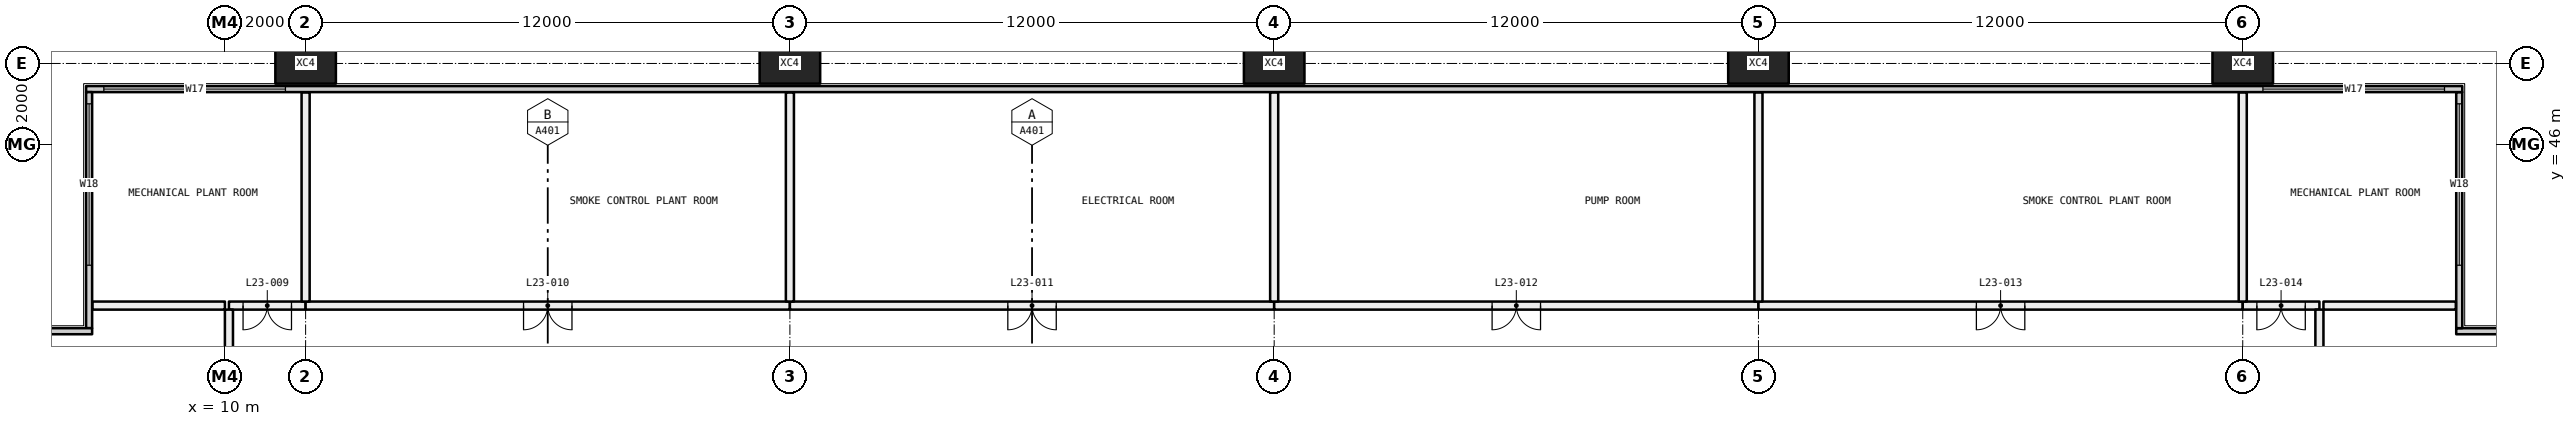
"""IFC4 building model, lengths in metres.
Left out: names, types, materials, properties, quantities, classifications, styles, units other than length and angle.
Written with IfcOpenShell. Run it as: python <this file> out.ifc"""

import sys

from ifc_helpers import new_model, si_unit, direction, frame, frame_2d, origin, origin_2d, place, context, subcontext, project, spatial, rectangle, hollow_rectangle, extrude, element, fill, save


model = new_model("IFC4")
c1 = context("Model", 3, precision=1e-05, world=origin(), true_north=direction((0.0, 1.0)))
c2 = subcontext(c1, "Body", "Model", "MODEL_VIEW")
j1 = project(units=[si_unit("LENGTHUNIT", "METRE"), si_unit("PLANEANGLEUNIT", "RADIAN")], contexts=[c1])
p1 = place(None, origin())
s1 = spatial("IfcSite", under=j1, at=p1, CompositionType="ELEMENT")
p2 = place(p1, origin())
s2 = spatial("IfcBuilding", under=s1, at=p2, CompositionType="ELEMENT")
p3 = place(p2, frame((0.0, 0.0, 92.1)))
s3 = spatial("IfcBuildingStorey", under=s2, at=p3, CompositionType="ELEMENT", Elevation=92.1)
for number, where, z_axis, x_axis in (
    (1, (12.0, 48.0, -0.4), (0.0, 0.0, 1.0), (1.0, 0.0, 0.0)),
    (2, (24.0, 48.0, -0.4), (0.0, 0.0, 1.0), (1.0, 0.0, 0.0)),
    (3, (36.0, 48.0, -0.4), (0.0, 0.0, 1.0), (1.0, 0.0, 0.0)),
    (4, (48.0, 48.0, -0.4), (0.0, 0.0, 1.0), (1.0, 0.0, 0.0)),
    (5, (60.0, 48.0, -0.4), (0.0, 0.0, 1.0), (1.0, 0.0, 0.0)),
):
    element("IfcColumn", number, at=place(p3, frame(where, z_axis=z_axis, x_axis=x_axis)), inside=s3, PredefinedType="COLUMN", context=c2, shape_type="SweptSolid", body=[
        extrude(hollow_rectangle(XDim=1.5, YDim=1.0, WallThickness=0.06, at=origin_2d()), origin(), (0.0, 0.0, 1.0), 4.5),
    ])
p4 = place(p3, frame((65.29, 41.365, 0.0), z_axis=(0.0, 0.0, 1.0), x_axis=(1.0, 0.0, 0.0)))
e6 = element("IfcWall", 6, at=p4, inside=s3, PredefinedType="ELEMENTEDWALL", context=c2, shape_type="SweptSolid", body=[
    extrude(rectangle(XDim=6.15, YDim=0.15, at=frame_2d((3.075, 0.0))), origin(), (0.0, 0.0, 1.0), 4.1),
])
p5 = place(p4, frame((1.71, 0.0, 0.45)))
e7 = element("IfcOpeningElement", 7, at=p5, cuts=e6, PredefinedType="OPENING", context=c2, shape_type="SweptSolid", body=[
    extrude(rectangle(XDim=4.0, YDim=3.6, at=frame_2d((2.0, 1.8))), frame((0.0, 0.085, 0.0), z_axis=(0.0, -1.0, 0.0), x_axis=(1.0, 0.0, 0.0)), (0.0, 0.0, 1.0), 0.17),
])
p6 = place(p3, frame((65.365, 41.44, 0.0), z_axis=(0.0, 0.0, 1.0), x_axis=(0.0, 1.0, 0.0)))
e8 = element("IfcWall", 8, at=p6, inside=s3, PredefinedType="ELEMENTEDWALL", context=c2, shape_type="SweptSolid", body=[
    extrude(rectangle(XDim=5.85, YDim=0.15, at=frame_2d((2.925, 0.0))), origin(), (0.0, 0.0, 1.0), 4.1),
])
p7 = place(p6, frame((1.56, 0.0, 0.45)))
e9 = element("IfcOpeningElement", 9, at=p7, cuts=e8, PredefinedType="OPENING", context=c2, shape_type="SweptSolid", body=[
    extrude(rectangle(XDim=4.0, YDim=3.6, at=frame_2d((2.0, 1.8))), frame((0.0, 0.085, 0.0), z_axis=(0.0, -1.0, 0.0), x_axis=(1.0, 0.0, 0.0)), (0.0, 0.0, 1.0), 0.17),
])
p8 = place(p3, frame((6.56, 47.365, 0.0), z_axis=(0.0, 0.0, 1.0), x_axis=(1.0, 0.0, 0.0)))
e10 = element("IfcWall", 10, at=p8, inside=s3, PredefinedType="ELEMENTEDWALL", context=c2, shape_type="SweptSolid", body=[
    extrude(rectangle(XDim=58.88, YDim=0.15, at=frame_2d((29.44, 0.0))), origin(), (0.0, 0.0, 1.0), 4.1),
])
p9 = place(p8, frame((0.44, 0.0, 0.45)))
e11 = element("IfcOpeningElement", 11, at=p9, cuts=e10, PredefinedType="OPENING", context=c2, shape_type="SweptSolid", body=[
    extrude(rectangle(XDim=4.5, YDim=3.6, at=frame_2d((2.25, 1.8))), frame((0.0, 0.085, 0.0), z_axis=(0.0, -1.0, 0.0), x_axis=(1.0, 0.0, 0.0)), (0.0, 0.0, 1.0), 0.17),
])
p10 = place(p8, frame((53.94, 0.0, 0.45)))
e12 = element("IfcOpeningElement", 12, at=p10, cuts=e10, PredefinedType="OPENING", context=c2, shape_type="SweptSolid", body=[
    extrude(rectangle(XDim=4.5, YDim=3.6, at=frame_2d((2.25, 1.8))), frame((0.0, 0.085, 0.0), z_axis=(0.0, -1.0, 0.0), x_axis=(1.0, 0.0, 0.0)), (0.0, 0.0, 1.0), 0.17),
])
p11 = place(p3, frame((6.635, 41.44, 0.0), z_axis=(0.0, 0.0, 1.0), x_axis=(0.0, 1.0, 0.0)))
e13 = element("IfcWall", 13, at=p11, inside=s3, PredefinedType="ELEMENTEDWALL", context=c2, shape_type="SweptSolid", body=[
    extrude(rectangle(XDim=5.85, YDim=0.15, at=frame_2d((2.925, 0.0))), origin(), (0.0, 0.0, 1.0), 4.1),
])
p12 = place(p11, frame((1.56, 0.0, 0.45)))
e14 = element("IfcOpeningElement", 14, at=p12, cuts=e13, PredefinedType="OPENING", context=c2, shape_type="SweptSolid", body=[
    extrude(rectangle(XDim=4.0, YDim=3.6, at=frame_2d((2.0, 1.8))), frame((0.0, 0.085, 0.0), z_axis=(0.0, -1.0, 0.0), x_axis=(1.0, 0.0, 0.0)), (0.0, 0.0, 1.0), 0.17),
])
p13 = place(p3, frame((0.56, 41.365, 0.0), z_axis=(0.0, 0.0, 1.0), x_axis=(1.0, 0.0, 0.0)))
e15 = element("IfcWall", 15, at=p13, inside=s3, PredefinedType="ELEMENTEDWALL", context=c2, shape_type="SweptSolid", body=[
    extrude(rectangle(XDim=6.15, YDim=0.15, at=frame_2d((3.075, 0.0))), origin(), (0.0, 0.0, 1.0), 4.1),
])
p14 = place(p13, frame((0.44, 0.0, 0.45)))
e16 = element("IfcOpeningElement", 16, at=p14, cuts=e15, PredefinedType="OPENING", context=c2, shape_type="SweptSolid", body=[
    extrude(rectangle(XDim=4.0, YDim=3.6, at=frame_2d((2.0, 1.8))), frame((0.0, 0.085, 0.0), z_axis=(0.0, -1.0, 0.0), x_axis=(1.0, 0.0, 0.0)), (0.0, 0.0, 1.0), 0.17),
])
p15 = place(p3, frame((12.0, 42.0, 0.0), z_axis=(0.0, 0.0, 1.0), x_axis=(-1.0, 0.0, 0.0)))
e17 = element("IfcWall", 17, at=p15, inside=s3, PredefinedType="PARTITIONING", context=c2, shape_type="SweptSolid", body=[
    extrude(rectangle(XDim=1.9, YDim=0.2, at=frame_2d((0.95, 0.0))), origin(), (0.0, 0.0, 1.0), 4.1),
])
p16 = place(p15, frame((0.35, 0.0, 0.0)))
e18 = element("IfcOpeningElement", 18, at=p16, cuts=e17, PredefinedType="OPENING", context=c2, shape_type="SweptSolid", body=[
    extrude(rectangle(XDim=1.2, YDim=2.1, at=frame_2d((0.6, 1.05))), frame((0.0, 0.11, 0.0), z_axis=(0.0, -1.0, 0.0), x_axis=(1.0, 0.0, 0.0)), (0.0, 0.0, 1.0), 0.22),
])
p17 = place(p3, frame((24.0, 42.0, 0.0), z_axis=(0.0, 0.0, 1.0), x_axis=(-1.0, 0.0, 0.0)))
e19 = element("IfcWall", 19, at=p17, inside=s3, PredefinedType="PARTITIONING", context=c2, shape_type="SweptSolid", body=[
    extrude(rectangle(XDim=12.0, YDim=0.2, at=frame_2d((6.0, 0.0))), origin(), (0.0, 0.0, 1.0), 4.1),
])
p18 = place(p17, frame((5.4, 0.0, 0.0)))
e20 = element("IfcOpeningElement", 20, at=p18, cuts=e19, PredefinedType="OPENING", context=c2, shape_type="SweptSolid", body=[
    extrude(rectangle(XDim=1.2, YDim=2.1, at=frame_2d((0.6, 1.05))), frame((0.0, 0.11, 0.0), z_axis=(0.0, -1.0, 0.0), x_axis=(1.0, 0.0, 0.0)), (0.0, 0.0, 1.0), 0.22),
])
p19 = place(p3, frame((36.0, 42.0, 0.0), z_axis=(0.0, 0.0, 1.0), x_axis=(-1.0, 0.0, 0.0)))
e21 = element("IfcWall", 21, at=p19, inside=s3, PredefinedType="PARTITIONING", context=c2, shape_type="SweptSolid", body=[
    extrude(rectangle(XDim=12.0, YDim=0.2, at=frame_2d((6.0, 0.0))), origin(), (0.0, 0.0, 1.0), 3.5),
])
p20 = place(p19, frame((5.4, 0.0, 0.0)))
e22 = element("IfcOpeningElement", 22, at=p20, cuts=e21, PredefinedType="OPENING", context=c2, shape_type="SweptSolid", body=[
    extrude(rectangle(XDim=1.2, YDim=2.1, at=frame_2d((0.6, 1.05))), frame((0.0, 0.11, 0.0), z_axis=(0.0, -1.0, 0.0), x_axis=(1.0, 0.0, 0.0)), (0.0, 0.0, 1.0), 0.22),
])
p21 = place(p3, frame((48.0, 42.0, 0.0), z_axis=(0.0, 0.0, 1.0), x_axis=(-1.0, 0.0, 0.0)))
e23 = element("IfcWall", 23, at=p21, inside=s3, PredefinedType="PARTITIONING", context=c2, shape_type="SweptSolid", body=[
    extrude(rectangle(XDim=12.0, YDim=0.2, at=frame_2d((6.0, 0.0))), origin(), (0.0, 0.0, 1.0), 3.5),
])
p22 = place(p21, frame((5.4, 0.0, 0.0)))
e24 = element("IfcOpeningElement", 24, at=p22, cuts=e23, PredefinedType="OPENING", context=c2, shape_type="SweptSolid", body=[
    extrude(rectangle(XDim=1.2, YDim=2.1, at=frame_2d((0.6, 1.05))), frame((0.0, 0.11, 0.0), z_axis=(0.0, -1.0, 0.0), x_axis=(1.0, 0.0, 0.0)), (0.0, 0.0, 1.0), 0.22),
])
p23 = place(p3, frame((60.0, 42.0, 0.0), z_axis=(0.0, 0.0, 1.0), x_axis=(-1.0, 0.0, 0.0)))
e25 = element("IfcWall", 25, at=p23, inside=s3, PredefinedType="PARTITIONING", context=c2, shape_type="SweptSolid", body=[
    extrude(rectangle(XDim=12.0, YDim=0.2, at=frame_2d((6.0, 0.0))), origin(), (0.0, 0.0, 1.0), 4.1),
])
p24 = place(p23, frame((5.4, 0.0, 0.0)))
e26 = element("IfcOpeningElement", 26, at=p24, cuts=e25, PredefinedType="OPENING", context=c2, shape_type="SweptSolid", body=[
    extrude(rectangle(XDim=1.2, YDim=2.1, at=frame_2d((0.6, 1.05))), frame((0.0, 0.11, 0.0), z_axis=(0.0, -1.0, 0.0), x_axis=(1.0, 0.0, 0.0)), (0.0, 0.0, 1.0), 0.22),
])
p25 = place(p3, frame((61.9, 42.0, 0.0), z_axis=(0.0, 0.0, 1.0), x_axis=(-1.0, 0.0, 0.0)))
e27 = element("IfcWall", 27, at=p25, inside=s3, PredefinedType="PARTITIONING", context=c2, shape_type="SweptSolid", body=[
    extrude(rectangle(XDim=1.9, YDim=0.2, at=frame_2d((0.95, 0.0))), origin(), (0.0, 0.0, 1.0), 4.1),
])
p26 = place(p25, frame((0.35, 0.0, 0.0)))
e28 = element("IfcOpeningElement", 28, at=p26, cuts=e27, PredefinedType="OPENING", context=c2, shape_type="SweptSolid", body=[
    extrude(rectangle(XDim=1.2, YDim=2.1, at=frame_2d((0.6, 1.05))), frame((0.0, 0.11, 0.0), z_axis=(0.0, -1.0, 0.0), x_axis=(1.0, 0.0, 0.0)), (0.0, 0.0, 1.0), 0.22),
])
p27 = place(p3, frame((10.1, 41.9, 0.0), z_axis=(0.0, 0.0, 1.0), x_axis=(0.0, -1.0, 0.0)))
e29 = element("IfcWall", 29, at=p27, inside=s3, PredefinedType="PARTITIONING", context=c2, shape_type="SweptSolid", body=[
    extrude(rectangle(XDim=17.9, YDim=0.2, at=frame_2d((8.95, 0.0))), origin(), (0.0, 0.0, 1.0), 3.5),
])
p28 = place(p27, frame((8.35, 0.0, 0.0)))
e30 = element("IfcOpeningElement", 30, at=p28, cuts=e29, PredefinedType="OPENING", context=c2, shape_type="SweptSolid", body=[
    extrude(rectangle(XDim=1.2, YDim=2.1, at=frame_2d((0.6, 1.05))), frame((0.0, 0.11, 0.0), z_axis=(0.0, -1.0, 0.0), x_axis=(1.0, 0.0, 0.0)), (0.0, 0.0, 1.0), 0.22),
])
p29 = place(p3, frame((61.9, 36.1, 0.0), z_axis=(0.0, 0.0, 1.0), x_axis=(0.0, 1.0, 0.0)))
e31 = element("IfcWall", 31, at=p29, inside=s3, PredefinedType="PARTITIONING", context=c2, shape_type="SweptSolid", body=[
    extrude(rectangle(XDim=5.8, YDim=0.2, at=frame_2d((2.9, 0.0))), origin(), (0.0, 0.0, 1.0), 4.1),
])
p30 = place(p3, frame((12.0, 42.1, 0.0), z_axis=(0.0, 0.0, 1.0), x_axis=(0.0, 1.0, 0.0)))
e32 = element("IfcWall", 32, at=p30, inside=s3, PredefinedType="PARTITIONING", context=c2, shape_type="SweptSolid", body=[
    extrude(rectangle(XDim=5.18, YDim=0.2, at=frame_2d((2.59, 0.0))), origin(), (0.0, 0.0, 1.0), 4.1),
])
p31 = place(p3, frame((6.72, 42.0, 0.0), z_axis=(0.0, 0.0, 1.0), x_axis=(1.0, 0.0, 0.0)))
e33 = element("IfcWall", 33, at=p31, inside=s3, PredefinedType="PARTITIONING", context=c2, shape_type="SweptSolid", body=[
    extrude(rectangle(XDim=3.28, YDim=0.2, at=frame_2d((1.64, 0.0))), origin(), (0.0, 0.0, 1.0), 4.1),
])
p32 = place(p3, frame((24.0, 42.1, 0.0), z_axis=(0.0, 0.0, 1.0), x_axis=(0.0, 1.0, 0.0)))
e34 = element("IfcWall", 34, at=p32, inside=s3, PredefinedType="PARTITIONING", context=c2, shape_type="SweptSolid", body=[
    extrude(rectangle(XDim=5.18, YDim=0.2, at=frame_2d((2.59, 0.0))), origin(), (0.0, 0.0, 1.0), 4.1),
])
p33 = place(p3, frame((36.0, 42.1, 0.0), z_axis=(0.0, 0.0, 1.0), x_axis=(0.0, 1.0, 0.0)))
e35 = element("IfcWall", 35, at=p33, inside=s3, PredefinedType="PARTITIONING", context=c2, shape_type="SweptSolid", body=[
    extrude(rectangle(XDim=5.18, YDim=0.2, at=frame_2d((2.59, 0.0))), origin(), (0.0, 0.0, 1.0), 3.5),
])
for number, where, z_axis, x_axis in (
    (36, (48.0, 42.1, 0.0), (0.0, 0.0, 1.0), (0.0, 1.0, 0.0)),
    (37, (60.0, 42.1, 0.0), (0.0, 0.0, 1.0), (0.0, 1.0, 0.0)),
):
    element("IfcWall", number, at=place(p3, frame(where, z_axis=z_axis, x_axis=x_axis)), inside=s3, PredefinedType="PARTITIONING", context=c2, shape_type="SweptSolid", body=[
        extrude(rectangle(XDim=5.18, YDim=0.2, at=frame_2d((2.59, 0.0))), origin(), (0.0, 0.0, 1.0), 4.1),
    ])
p34 = place(p3, frame((62.0, 42.0, 0.0), z_axis=(0.0, 0.0, 1.0), x_axis=(1.0, 0.0, 0.0)))
e38 = element("IfcWall", 38, at=p34, inside=s3, PredefinedType="PARTITIONING", context=c2, shape_type="SweptSolid", body=[
    extrude(rectangle(XDim=3.28, YDim=0.2, at=frame_2d((1.64, 0.0))), origin(), (0.0, 0.0, 1.0), 4.1),
])
p35 = place(p7, origin())
e39 = element("IfcWindow", 39, at=p35, inside=s3, PartitioningType="SINGLE_PANEL", PredefinedType="WINDOW", context=c2, shape_type="SweptSolid", body=[
    extrude(rectangle(XDim=4.0, YDim=3.6, at=frame_2d((2.0, 1.8))), frame((0.0, 0.03, 0.0), z_axis=(0.0, -1.0, 0.0), x_axis=(1.0, 0.0, 0.0)), (0.0, 0.0, 1.0), 0.06),
])
fill(e9, e39)
p36 = place(p9, origin())
e40 = element("IfcWindow", 40, at=p36, inside=s3, PartitioningType="SINGLE_PANEL", PredefinedType="WINDOW", context=c2, shape_type="SweptSolid", body=[
    extrude(rectangle(XDim=4.5, YDim=3.6, at=frame_2d((2.25, 1.8))), frame((0.0, 0.03, 0.0), z_axis=(0.0, -1.0, 0.0), x_axis=(1.0, 0.0, 0.0)), (0.0, 0.0, 1.0), 0.06),
])
fill(e11, e40)
p37 = place(p10, origin())
e41 = element("IfcWindow", 41, at=p37, inside=s3, PartitioningType="SINGLE_PANEL", PredefinedType="WINDOW", context=c2, shape_type="SweptSolid", body=[
    extrude(rectangle(XDim=4.5, YDim=3.6, at=frame_2d((2.25, 1.8))), frame((0.0, 0.03, 0.0), z_axis=(0.0, -1.0, 0.0), x_axis=(1.0, 0.0, 0.0)), (0.0, 0.0, 1.0), 0.06),
])
fill(e12, e41)
p38 = place(p12, origin())
e42 = element("IfcWindow", 42, at=p38, inside=s3, PartitioningType="SINGLE_PANEL", PredefinedType="WINDOW", context=c2, shape_type="SweptSolid", body=[
    extrude(rectangle(XDim=4.0, YDim=3.6, at=frame_2d((2.0, 1.8))), frame((0.0, 0.03, 0.0), z_axis=(0.0, -1.0, 0.0), x_axis=(1.0, 0.0, 0.0)), (0.0, 0.0, 1.0), 0.06),
])
fill(e14, e42)
p39 = place(p16, origin())
e43 = element("IfcDoor", 43, at=p39, inside=s3, OperationType="DOUBLE_DOOR_SINGLE_SWING", PredefinedType="DOOR", context=c2, shape_type="SweptSolid", body=[
    extrude(rectangle(XDim=1.2, YDim=2.1, at=frame_2d((0.6, 1.05))), frame((0.0, 0.025, 0.0), z_axis=(0.0, -1.0, 0.0), x_axis=(1.0, 0.0, 0.0)), (0.0, 0.0, 1.0), 0.05),
])
fill(e18, e43)
p40 = place(p18, origin())
e44 = element("IfcDoor", 44, at=p40, inside=s3, OperationType="DOUBLE_DOOR_SINGLE_SWING", PredefinedType="DOOR", context=c2, shape_type="SweptSolid", body=[
    extrude(rectangle(XDim=1.2, YDim=2.1, at=frame_2d((0.6, 1.05))), frame((0.0, 0.025, 0.0), z_axis=(0.0, -1.0, 0.0), x_axis=(1.0, 0.0, 0.0)), (0.0, 0.0, 1.0), 0.05),
])
fill(e20, e44)
p41 = place(p20, origin())
e45 = element("IfcDoor", 45, at=p41, inside=s3, OperationType="DOUBLE_DOOR_SINGLE_SWING", PredefinedType="DOOR", context=c2, shape_type="SweptSolid", body=[
    extrude(rectangle(XDim=1.2, YDim=2.1, at=frame_2d((0.6, 1.05))), frame((0.0, 0.025, 0.0), z_axis=(0.0, -1.0, 0.0), x_axis=(1.0, 0.0, 0.0)), (0.0, 0.0, 1.0), 0.05),
])
fill(e22, e45)
p42 = place(p22, origin())
e46 = element("IfcDoor", 46, at=p42, inside=s3, OperationType="DOUBLE_DOOR_SINGLE_SWING", PredefinedType="DOOR", context=c2, shape_type="SweptSolid", body=[
    extrude(rectangle(XDim=1.2, YDim=2.1, at=frame_2d((0.6, 1.05))), frame((0.0, 0.025, 0.0), z_axis=(0.0, -1.0, 0.0), x_axis=(1.0, 0.0, 0.0)), (0.0, 0.0, 1.0), 0.05),
])
fill(e24, e46)
p43 = place(p24, origin())
e47 = element("IfcDoor", 47, at=p43, inside=s3, OperationType="DOUBLE_DOOR_SINGLE_SWING", PredefinedType="DOOR", context=c2, shape_type="SweptSolid", body=[
    extrude(rectangle(XDim=1.2, YDim=2.1, at=frame_2d((0.6, 1.05))), frame((0.0, 0.025, 0.0), z_axis=(0.0, -1.0, 0.0), x_axis=(1.0, 0.0, 0.0)), (0.0, 0.0, 1.0), 0.05),
])
fill(e26, e47)
p44 = place(p26, origin())
e48 = element("IfcDoor", 48, at=p44, inside=s3, OperationType="DOUBLE_DOOR_SINGLE_SWING", PredefinedType="DOOR", context=c2, shape_type="SweptSolid", body=[
    extrude(rectangle(XDim=1.2, YDim=2.1, at=frame_2d((0.6, 1.05))), frame((0.0, 0.025, 0.0), z_axis=(0.0, -1.0, 0.0), x_axis=(1.0, 0.0, 0.0)), (0.0, 0.0, 1.0), 0.05),
])
fill(e28, e48)
save(model, sys.argv[1])
